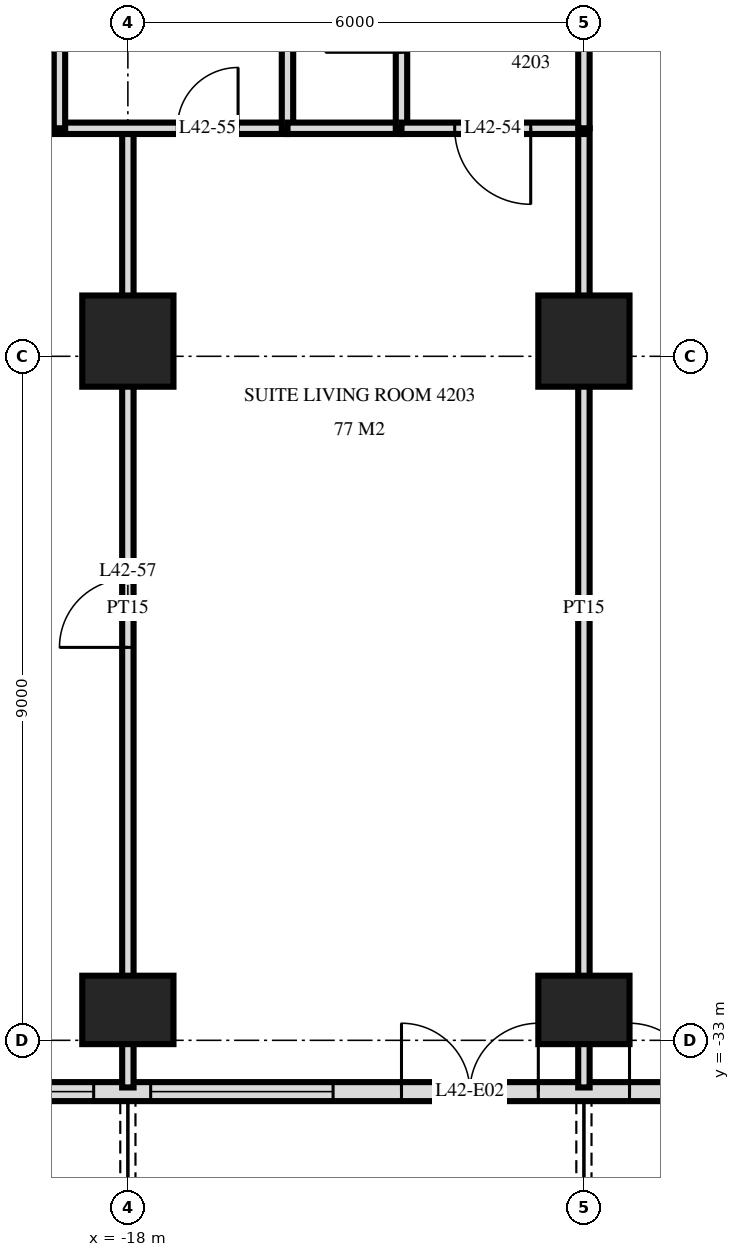
"""IFC4 building model, lengths in metres.
Left out: names, types, materials, properties, quantities, classifications, styles, units other than length and angle.
Written with IfcOpenShell. Run it as: python <this file> out.ifc"""

import sys

from ifc_helpers import new_model, si_unit, direction, frame, frame_2d, origin, origin_2d, place, context, subcontext, project, spatial, rectangle, extrude, element, fill, save


model = new_model("IFC4")
c1 = context("Model", 3, precision=1e-05, world=origin(), true_north=direction((0.0, 1.0)))
c2 = subcontext(c1, "Body", "Model", "MODEL_VIEW")
j1 = project(units=[si_unit("LENGTHUNIT", "METRE"), si_unit("PLANEANGLEUNIT", "RADIAN")], contexts=[c1])
p1 = place(None, origin())
s1 = spatial("IfcSite", under=j1, at=p1, CompositionType="ELEMENT")
p2 = place(p1, origin())
s2 = spatial("IfcBuilding", under=s1, at=p2, CompositionType="ELEMENT")
p3 = place(p2, frame((0.0, 0.0, 163.2)))
s3 = spatial("IfcBuildingStorey", under=s2, at=p3, CompositionType="ELEMENT", Elevation=163.2)
p4 = place(p3, frame((-18.0, -32.6, 0.0), z_axis=(0.0, 0.0, 1.0), x_axis=(1.0, 0.0, 0.0)))
e1 = element("IfcColumn", 1, at=p4, inside=s3, PredefinedType="COLUMN", context=c2, shape_type="SweptSolid", body=[
    extrude(rectangle(XDim=1.2, YDim=0.9, at=origin_2d()), origin(), (0.0, 0.0, 1.0), 3.6),
])
p5 = place(p3, frame((-18.0, -23.8, 0.0), z_axis=(0.0, 0.0, 1.0), x_axis=(1.0, 0.0, 0.0)))
e2 = element("IfcColumn", 2, at=p5, inside=s3, PredefinedType="COLUMN", context=c2, shape_type="SweptSolid", body=[
    extrude(rectangle(XDim=1.2, YDim=1.2, at=origin_2d()), origin(), (0.0, 0.0, 1.0), 3.6),
])
p6 = place(p3, frame((-12.0, -32.6, 0.0), z_axis=(0.0, 0.0, 1.0), x_axis=(1.0, 0.0, 0.0)))
e3 = element("IfcColumn", 3, at=p6, inside=s3, PredefinedType="COLUMN", context=c2, shape_type="SweptSolid", body=[
    extrude(rectangle(XDim=1.2, YDim=0.9, at=origin_2d()), origin(), (0.0, 0.0, 1.0), 3.6),
])
p7 = place(p3, frame((-12.0, -23.8, 0.0), z_axis=(0.0, 0.0, 1.0), x_axis=(1.0, 0.0, 0.0)))
e4 = element("IfcColumn", 4, at=p7, inside=s3, PredefinedType="COLUMN", context=c2, shape_type="SweptSolid", body=[
    extrude(rectangle(XDim=1.2, YDim=1.2, at=origin_2d()), origin(), (0.0, 0.0, 1.0), 3.6),
])
p8 = place(p3, frame((-23.675, -33.675, 0.0), z_axis=(0.0, 0.0, 1.0), x_axis=(1.0, 0.0, 0.0)))
e5 = element("IfcWall", 5, at=p8, inside=s3, PredefinedType="SOLIDWALL", context=c2, shape_type="SweptSolid", body=[
    extrude(rectangle(XDim=47.351, YDim=0.25, at=frame_2d((23.675, 0.0))), origin(), (0.0, 0.0, 1.0), 3.32),
])
p9 = place(p8, frame((0.575, 0.0, 0.0)))
e6 = element("IfcOpeningElement", 6, at=p9, cuts=e5, PredefinedType="OPENING", context=c2, shape_type="SweptSolid", body=[
    extrude(rectangle(XDim=1.8, YDim=2.4, at=frame_2d((0.9, 1.2))), frame((0.0, 0.135, 0.0), z_axis=(0.0, -1.0, 0.0), x_axis=(1.0, 0.0, 0.0)), (0.0, 0.0, 1.0), 0.27),
])
p10 = place(p8, frame((3.425, 0.0, 0.3)))
e7 = element("IfcOpeningElement", 7, at=p10, cuts=e5, PredefinedType="OPENING", context=c2, shape_type="SweptSolid", body=[
    extrude(rectangle(XDim=1.8, YDim=2.1, at=frame_2d((0.9, 1.05))), frame((0.0, 0.135, 0.0), z_axis=(0.0, -1.0, 0.0), x_axis=(1.0, 0.0, 0.0)), (0.0, 0.0, 1.0), 0.27),
])
p11 = place(p8, frame((5.975, 0.0, 0.3)))
e8 = element("IfcOpeningElement", 8, at=p11, cuts=e5, PredefinedType="OPENING", context=c2, shape_type="SweptSolid", body=[
    extrude(rectangle(XDim=2.4, YDim=2.1, at=frame_2d((1.2, 1.05))), frame((0.0, 0.135, 0.0), z_axis=(0.0, -1.0, 0.0), x_axis=(1.0, 0.0, 0.0)), (0.0, 0.0, 1.0), 0.27),
])
p12 = place(p8, frame((9.275, 0.0, 0.0)))
e9 = element("IfcOpeningElement", 9, at=p12, cuts=e5, PredefinedType="OPENING", context=c2, shape_type="SweptSolid", body=[
    extrude(rectangle(XDim=1.8, YDim=2.4, at=frame_2d((0.9, 1.2))), frame((0.0, 0.135, 0.0), z_axis=(0.0, -1.0, 0.0), x_axis=(1.0, 0.0, 0.0)), (0.0, 0.0, 1.0), 0.27),
])
p13 = place(p8, frame((12.275, 0.0, 0.0)))
e10 = element("IfcOpeningElement", 10, at=p13, cuts=e5, PredefinedType="OPENING", context=c2, shape_type="SweptSolid", body=[
    extrude(rectangle(XDim=1.8, YDim=2.4, at=frame_2d((0.9, 1.2))), frame((0.0, 0.135, 0.0), z_axis=(0.0, -1.0, 0.0), x_axis=(1.0, 0.0, 0.0)), (0.0, 0.0, 1.0), 0.27),
])
p14 = place(p8, frame((14.975, 0.0, 0.3)))
e11 = element("IfcOpeningElement", 11, at=p14, cuts=e5, PredefinedType="OPENING", context=c2, shape_type="SweptSolid", body=[
    extrude(rectangle(XDim=2.4, YDim=2.1, at=frame_2d((1.2, 1.05))), frame((0.0, 0.135, 0.0), z_axis=(0.0, -1.0, 0.0), x_axis=(1.0, 0.0, 0.0)), (0.0, 0.0, 1.0), 0.27),
])
p15 = place(p8, frame((17.975, 0.0, 0.3)))
e12 = element("IfcOpeningElement", 12, at=p15, cuts=e5, PredefinedType="OPENING", context=c2, shape_type="SweptSolid", body=[
    extrude(rectangle(XDim=2.4, YDim=2.1, at=frame_2d((1.2, 1.05))), frame((0.0, 0.135, 0.0), z_axis=(0.0, -1.0, 0.0), x_axis=(1.0, 0.0, 0.0)), (0.0, 0.0, 1.0), 0.27),
])
p16 = place(p8, frame((21.275, 0.0, 0.0)))
e13 = element("IfcOpeningElement", 13, at=p16, cuts=e5, PredefinedType="OPENING", context=c2, shape_type="SweptSolid", body=[
    extrude(rectangle(XDim=1.8, YDim=2.4, at=frame_2d((0.9, 1.2))), frame((0.0, 0.135, 0.0), z_axis=(0.0, -1.0, 0.0), x_axis=(1.0, 0.0, 0.0)), (0.0, 0.0, 1.0), 0.27),
])
p17 = place(p8, frame((24.275, 0.0, 0.0)))
e14 = element("IfcOpeningElement", 14, at=p17, cuts=e5, PredefinedType="OPENING", context=c2, shape_type="SweptSolid", body=[
    extrude(rectangle(XDim=1.8, YDim=2.4, at=frame_2d((0.9, 1.2))), frame((0.0, 0.135, 0.0), z_axis=(0.0, -1.0, 0.0), x_axis=(1.0, 0.0, 0.0)), (0.0, 0.0, 1.0), 0.27),
])
p18 = place(p8, frame((26.975, 0.0, 0.3)))
e15 = element("IfcOpeningElement", 15, at=p18, cuts=e5, PredefinedType="OPENING", context=c2, shape_type="SweptSolid", body=[
    extrude(rectangle(XDim=2.4, YDim=2.1, at=frame_2d((1.2, 1.05))), frame((0.0, 0.135, 0.0), z_axis=(0.0, -1.0, 0.0), x_axis=(1.0, 0.0, 0.0)), (0.0, 0.0, 1.0), 0.27),
])
p19 = place(p8, frame((30.275, 0.0, 0.0)))
e16 = element("IfcOpeningElement", 16, at=p19, cuts=e5, PredefinedType="OPENING", context=c2, shape_type="SweptSolid", body=[
    extrude(rectangle(XDim=1.8, YDim=2.4, at=frame_2d((0.9, 1.2))), frame((0.0, 0.135, 0.0), z_axis=(0.0, -1.0, 0.0), x_axis=(1.0, 0.0, 0.0)), (0.0, 0.0, 1.0), 0.27),
])
p20 = place(p8, frame((32.975, 0.0, 0.3)))
e17 = element("IfcOpeningElement", 17, at=p20, cuts=e5, PredefinedType="OPENING", context=c2, shape_type="SweptSolid", body=[
    extrude(rectangle(XDim=2.4, YDim=2.1, at=frame_2d((1.2, 1.05))), frame((0.0, 0.135, 0.0), z_axis=(0.0, -1.0, 0.0), x_axis=(1.0, 0.0, 0.0)), (0.0, 0.0, 1.0), 0.27),
])
p21 = place(p8, frame((36.275, 0.0, 0.0)))
e18 = element("IfcOpeningElement", 18, at=p21, cuts=e5, PredefinedType="OPENING", context=c2, shape_type="SweptSolid", body=[
    extrude(rectangle(XDim=1.8, YDim=2.4, at=frame_2d((0.9, 1.2))), frame((0.0, 0.135, 0.0), z_axis=(0.0, -1.0, 0.0), x_axis=(1.0, 0.0, 0.0)), (0.0, 0.0, 1.0), 0.27),
])
p22 = place(p8, frame((38.975, 0.0, 0.3)))
e19 = element("IfcOpeningElement", 19, at=p22, cuts=e5, PredefinedType="OPENING", context=c2, shape_type="SweptSolid", body=[
    extrude(rectangle(XDim=2.4, YDim=2.1, at=frame_2d((1.2, 1.05))), frame((0.0, 0.135, 0.0), z_axis=(0.0, -1.0, 0.0), x_axis=(1.0, 0.0, 0.0)), (0.0, 0.0, 1.0), 0.27),
])
p23 = place(p8, frame((41.975, 0.0, 0.3)))
e20 = element("IfcOpeningElement", 20, at=p23, cuts=e5, PredefinedType="OPENING", context=c2, shape_type="SweptSolid", body=[
    extrude(rectangle(XDim=2.4, YDim=2.1, at=frame_2d((1.2, 1.05))), frame((0.0, 0.135, 0.0), z_axis=(0.0, -1.0, 0.0), x_axis=(1.0, 0.0, 0.0)), (0.0, 0.0, 1.0), 0.27),
])
p24 = place(p8, frame((45.125, 0.0, 0.0)))
e21 = element("IfcOpeningElement", 21, at=p24, cuts=e5, PredefinedType="OPENING", context=c2, shape_type="SweptSolid", body=[
    extrude(rectangle(XDim=1.8, YDim=2.4, at=frame_2d((0.9, 1.2))), frame((0.0, 0.135, 0.0), z_axis=(0.0, -1.0, 0.0), x_axis=(1.0, 0.0, 0.0)), (0.0, 0.0, 1.0), 0.27),
])
p25 = place(p3, frame((-12.0, -21.0, 0.0), z_axis=(0.0, 0.0, 1.0), x_axis=(0.0, 1.0, 0.0)))
e22 = element("IfcWall", 22, at=p25, inside=s3, PredefinedType="PARTITIONING", context=c2, shape_type="SweptSolid", body=[
    extrude(rectangle(XDim=5.95, YDim=0.15, at=frame_2d((2.975, 0.0))), origin(), (0.0, 0.0, 1.0), 3.32),
])
p26 = place(p25, frame((4.0, 0.0, 0.0)))
e23 = element("IfcOpeningElement", 23, at=p26, cuts=e22, PredefinedType="OPENING", context=c2, shape_type="SweptSolid", body=[
    extrude(rectangle(XDim=1.0, YDim=2.1, at=frame_2d((0.5, 1.05))), frame((0.0, 0.085, 0.0), z_axis=(0.0, -1.0, 0.0), x_axis=(1.0, 0.0, 0.0)), (0.0, 0.0, 1.0), 0.17),
])
p27 = place(p3, frame((-12.0, -33.62, 0.0), z_axis=(0.0, 0.0, 1.0), x_axis=(0.0, 1.0, 0.0)))
e24 = element("IfcWall", 24, at=p27, inside=s3, PredefinedType="PARTITIONING", context=c2, shape_type="SweptSolid", body=[
    extrude(rectangle(XDim=12.62, YDim=0.15, at=frame_2d((6.31, 0.0))), origin(), (0.0, 0.0, 1.0), 3.32),
])
p28 = place(p3, frame((-14.4, -21.0, 0.0), z_axis=(0.0, 0.0, 1.0), x_axis=(0.0, 1.0, 0.0)))
e25 = element("IfcWall", 25, at=p28, inside=s3, PredefinedType="PARTITIONING", context=c2, shape_type="SweptSolid", body=[
    extrude(rectangle(XDim=3.0, YDim=0.15, at=frame_2d((1.5, 0.0))), origin(), (0.0, 0.0, 1.0), 3.32),
])
p29 = place(p28, frame((1.0, 0.0, 0.0)))
e26 = element("IfcOpeningElement", 26, at=p29, cuts=e25, PredefinedType="OPENING", context=c2, shape_type="SweptSolid", body=[
    extrude(rectangle(XDim=1.0, YDim=2.1, at=frame_2d((0.5, 1.05))), frame((0.0, 0.085, 0.0), z_axis=(0.0, -1.0, 0.0), x_axis=(1.0, 0.0, 0.0)), (0.0, 0.0, 1.0), 0.17),
])
p30 = place(p3, frame((-15.9, -21.0, 0.0), z_axis=(0.0, 0.0, 1.0), x_axis=(0.0, 1.0, 0.0)))
e27 = element("IfcWall", 27, at=p30, inside=s3, PredefinedType="PLUMBINGWALL", context=c2, shape_type="SweptSolid", body=[
    extrude(rectangle(XDim=3.0, YDim=0.15, at=frame_2d((1.5, 0.0))), origin(), (0.0, 0.0, 1.0), 3.32),
])
p31 = place(p3, frame((-18.0, -33.62, 0.0), z_axis=(0.0, 0.0, 1.0), x_axis=(0.0, 1.0, 0.0)))
e28 = element("IfcWall", 28, at=p31, inside=s3, PredefinedType="PARTITIONING", context=c2, shape_type="SweptSolid", body=[
    extrude(rectangle(XDim=12.62, YDim=0.15, at=frame_2d((6.31, 0.0))), origin(), (0.0, 0.0, 1.0), 3.32),
])
p32 = place(p31, frame((5.79, 0.0, 0.0)))
e29 = element("IfcOpeningElement", 29, at=p32, cuts=e28, PredefinedType="OPENING", context=c2, shape_type="SweptSolid", body=[
    extrude(rectangle(XDim=0.9, YDim=2.1, at=frame_2d((0.45, 1.05))), frame((0.0, 0.085, 0.0), z_axis=(0.0, -1.0, 0.0), x_axis=(1.0, 0.0, 0.0)), (0.0, 0.0, 1.0), 0.17),
])
p33 = place(p3, frame((-18.9, -21.0, 0.0), z_axis=(0.0, 0.0, 1.0), x_axis=(0.0, 1.0, 0.0)))
e30 = element("IfcWall", 30, at=p33, inside=s3, PredefinedType="PARTITIONING", context=c2, shape_type="SweptSolid", body=[
    extrude(rectangle(XDim=3.0, YDim=0.15, at=frame_2d((1.5, 0.0))), origin(), (0.0, 0.0, 1.0), 3.32),
])
p34 = place(p3, frame((-14.4, -21.0, 0.0), z_axis=(0.0, 0.0, 1.0), x_axis=(1.0, 0.0, 0.0)))
e31 = element("IfcWall", 31, at=p34, inside=s3, PredefinedType="PARTITIONING", context=c2, shape_type="SweptSolid", body=[
    extrude(rectangle(XDim=2.4, YDim=0.15, at=frame_2d((1.2, 0.0))), origin(), (0.0, 0.0, 1.0), 3.32),
])
p35 = place(p34, frame((0.7, 0.0, 0.0)))
e32 = element("IfcOpeningElement", 32, at=p35, cuts=e31, PredefinedType="OPENING", context=c2, shape_type="SweptSolid", body=[
    extrude(rectangle(XDim=1.0, YDim=2.1, at=frame_2d((0.5, 1.05))), frame((0.0, 0.085, 0.0), z_axis=(0.0, -1.0, 0.0), x_axis=(1.0, 0.0, 0.0)), (0.0, 0.0, 1.0), 0.17),
])
p36 = place(p3, frame((-28.02, -21.0, 0.0), z_axis=(0.0, 0.0, 1.0), x_axis=(1.0, 0.0, 0.0)))
e33 = element("IfcWall", 33, at=p36, inside=s3, PredefinedType="PARTITIONING", context=c2, shape_type="SweptSolid", body=[
    extrude(rectangle(XDim=12.12, YDim=0.15, at=frame_2d((6.06, 0.0))), origin(), (0.0, 0.0, 1.0), 3.32),
])
p37 = place(p36, frame((10.67, 0.0, 0.0)))
e34 = element("IfcOpeningElement", 34, at=p37, cuts=e33, PredefinedType="OPENING", context=c2, shape_type="SweptSolid", body=[
    extrude(rectangle(XDim=0.8, YDim=2.1, at=frame_2d((0.4, 1.05))), frame((0.0, 0.085, 0.0), z_axis=(0.0, -1.0, 0.0), x_axis=(1.0, 0.0, 0.0)), (0.0, 0.0, 1.0), 0.17),
])
p38 = place(p36, frame((4.02, 0.0, 0.0)))
e35 = element("IfcOpeningElement", 35, at=p38, cuts=e33, PredefinedType="OPENING", context=c2, shape_type="SweptSolid", body=[
    extrude(rectangle(XDim=0.9, YDim=2.1, at=frame_2d((0.45, 1.05))), frame((0.0, 0.085, 0.0), z_axis=(0.0, -1.0, 0.0), x_axis=(1.0, 0.0, 0.0)), (0.0, 0.0, 1.0), 0.17),
])
p39 = place(p3, frame((-15.9, -21.0, 0.0), z_axis=(0.0, 0.0, 1.0), x_axis=(1.0, 0.0, 0.0)))
e36 = element("IfcWall", 36, at=p39, inside=s3, PredefinedType="PLUMBINGWALL", context=c2, shape_type="SweptSolid", body=[
    extrude(rectangle(XDim=1.5, YDim=0.15, at=frame_2d((0.75, 0.0))), origin(), (0.0, 0.0, 1.0), 3.32),
])
p40 = place(p10, origin())
e37 = element("IfcWindow", 37, at=p40, inside=s3, PartitioningType="SINGLE_PANEL", PredefinedType="WINDOW", context=c2, shape_type="SweptSolid", body=[
    extrude(rectangle(XDim=1.8, YDim=2.1, at=frame_2d((0.9, 1.05))), frame((0.0, 0.03, 0.0), z_axis=(0.0, -1.0, 0.0), x_axis=(1.0, 0.0, 0.0)), (0.0, 0.0, 1.0), 0.06),
])
fill(e7, e37)
p41 = place(p11, origin())
e38 = element("IfcWindow", 38, at=p41, inside=s3, PartitioningType="SINGLE_PANEL", PredefinedType="WINDOW", context=c2, shape_type="SweptSolid", body=[
    extrude(rectangle(XDim=2.4, YDim=2.1, at=frame_2d((1.2, 1.05))), frame((0.0, 0.03, 0.0), z_axis=(0.0, -1.0, 0.0), x_axis=(1.0, 0.0, 0.0)), (0.0, 0.0, 1.0), 0.06),
])
fill(e8, e38)
p42 = place(p12, origin())
e39 = element("IfcDoor", 39, at=p42, inside=s3, OperationType="DOUBLE_DOOR_SINGLE_SWING", PredefinedType="DOOR", context=c2, shape_type="SweptSolid", body=[
    extrude(rectangle(XDim=1.8, YDim=2.4, at=frame_2d((0.9, 1.2))), frame((0.0, 0.025, 0.0), z_axis=(0.0, -1.0, 0.0), x_axis=(1.0, 0.0, 0.0)), (0.0, 0.0, 1.0), 0.05),
])
fill(e9, e39)
p43 = place(p13, origin())
e40 = element("IfcDoor", 40, at=p43, inside=s3, OperationType="DOUBLE_DOOR_SINGLE_SWING", PredefinedType="DOOR", context=c2, shape_type="SweptSolid", body=[
    extrude(rectangle(XDim=1.8, YDim=2.4, at=frame_2d((0.9, 1.2))), frame((0.0, 0.025, 0.0), z_axis=(0.0, -1.0, 0.0), x_axis=(1.0, 0.0, 0.0)), (0.0, 0.0, 1.0), 0.05),
])
fill(e10, e40)
p44 = place(p35, frame((0.5, 0.0, 0.0), z_axis=(0.0, 0.0, 1.0), x_axis=(-1.0, 0.0, 0.0)))
e41 = element("IfcDoor", 41, at=p44, inside=s3, OperationType="SINGLE_SWING_RIGHT", PredefinedType="DOOR", context=c2, shape_type="SweptSolid", body=[
    extrude(rectangle(XDim=1.0, YDim=2.1, at=frame_2d((0.0, 1.05))), frame((0.0, -0.025, 0.0), z_axis=(0.0, 1.0, 0.0), x_axis=(-1.0, 0.0, 0.0)), (0.0, 0.0, 1.0), 0.05),
])
fill(e32, e41)
p45 = place(p37, origin())
e42 = element("IfcDoor", 42, at=p45, inside=s3, OperationType="SINGLE_SWING_LEFT", PredefinedType="DOOR", context=c2, shape_type="SweptSolid", body=[
    extrude(rectangle(XDim=0.8, YDim=2.1, at=frame_2d((0.4, 1.05))), frame((0.0, 0.025, 0.0), z_axis=(0.0, -1.0, 0.0), x_axis=(1.0, 0.0, 0.0)), (0.0, 0.0, 1.0), 0.05),
])
fill(e34, e42)
p46 = place(p32, origin())
e43 = element("IfcDoor", 43, at=p46, inside=s3, OperationType="SINGLE_SWING_RIGHT", PredefinedType="DOOR", context=c2, shape_type="SweptSolid", body=[
    extrude(rectangle(XDim=0.9, YDim=2.1, at=frame_2d((0.45, 1.05))), frame((0.0, 0.025, 0.0), z_axis=(0.0, -1.0, 0.0), x_axis=(1.0, 0.0, 0.0)), (0.0, 0.0, 1.0), 0.05),
])
fill(e29, e43)
save(model, sys.argv[1])
